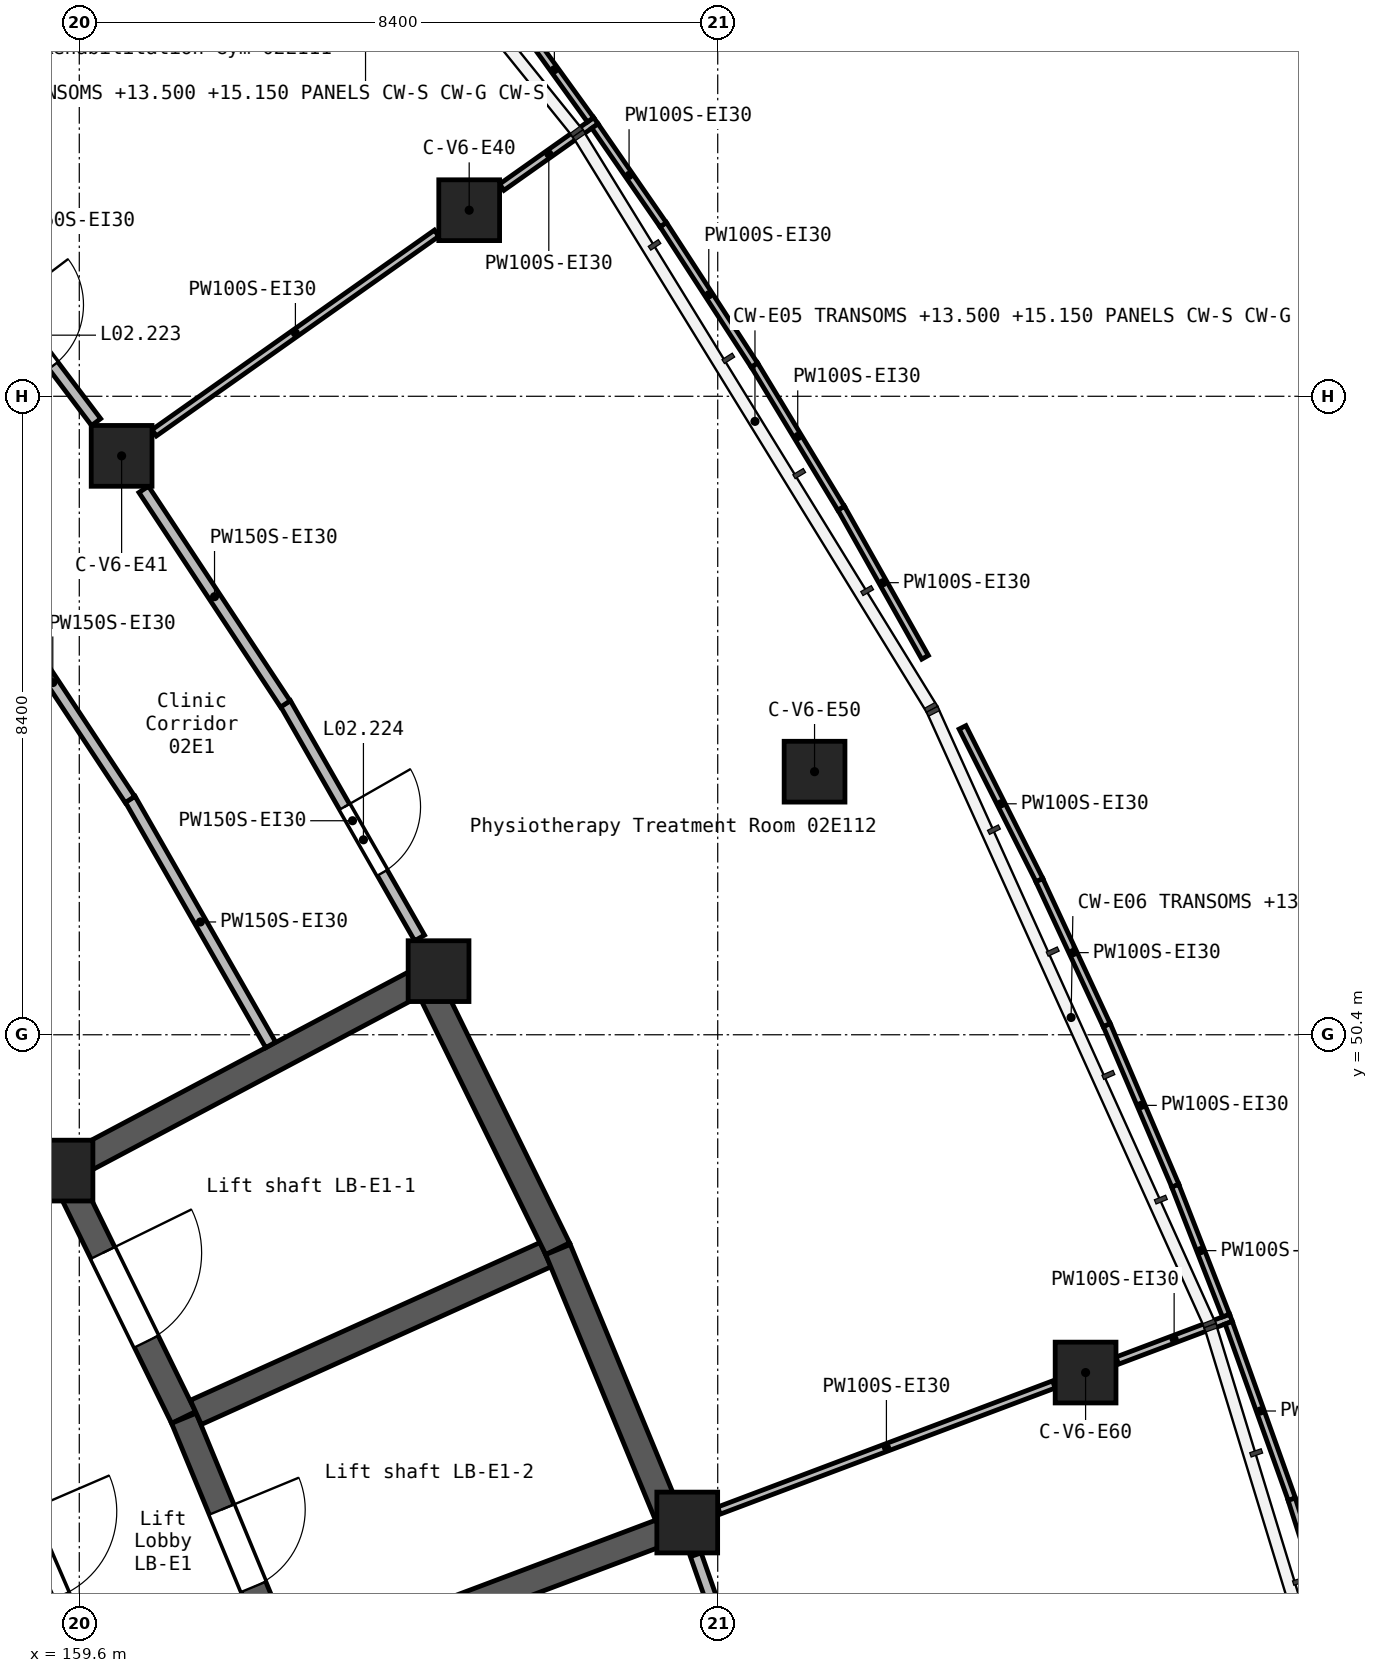
"""IFC4 building model, lengths in metres.
Left out: names, types, materials, properties, quantities, classifications, styles, units other than length and angle.
Written with IfcOpenShell. Run it as: python <this file> out.ifc"""

import sys

from ifc_helpers import new_model, si_unit, direction, frame, frame_2d, origin, origin_2d, place, context, subcontext, project, spatial, rectangle, extrude, element, fill, save


model = new_model("IFC4")
c1 = context("Model", 3, precision=1e-05, world=origin(), true_north=direction((0.0, 1.0)))
c2 = subcontext(c1, "Body", "Model", "MODEL_VIEW")
j1 = project(units=[si_unit("LENGTHUNIT", "METRE"), si_unit("PLANEANGLEUNIT", "RADIAN")], contexts=[c1])
p1 = place(None, origin())
s1 = spatial("IfcSite", under=j1, at=p1, CompositionType="ELEMENT")
p2 = place(p1, origin())
s2 = spatial("IfcBuilding", under=s1, at=p2, CompositionType="ELEMENT")
p3 = place(p2, frame((0.0, 0.0, 12.6)))
s3 = spatial("IfcBuildingStorey", under=s2, at=p3, CompositionType="ELEMENT", Elevation=12.6)
for number, where, z_axis, x_axis in (
    (1, (159.379, 48.613, 0.0), (0.0, 0.0, 1.0), (1.0, 0.0, 0.0)),
    (2, (160.157, 58.016, 0.0), (0.0, 0.0, 1.0), (1.0, 0.0, 0.0)),
    (3, (164.327, 51.237, 0.0), (0.0, 0.0, 1.0), (1.0, 0.0, 0.0)),
    (4, (164.73, 61.248, 0.0), (0.0, 0.0, 1.0), (1.0, 0.0, 0.0)),
    (5, (167.599, 43.983, 0.0), (0.0, 0.0, 1.0), (1.0, 0.0, 0.0)),
    (6, (169.274, 53.861, 0.0), (0.0, 0.0, 1.0), (1.0, 0.0, 0.0)),
    (7, (172.84, 45.956, 0.0), (0.0, 0.0, 1.0), (1.0, 0.0, 0.0)),
):
    element("IfcColumn", number, at=place(p3, frame(where, z_axis=z_axis, x_axis=x_axis)), inside=s3, PredefinedType="COLUMN", context=c2, shape_type="SweptSolid", body=[
        extrude(rectangle(XDim=0.8, YDim=0.8, at=origin_2d()), origin(), (0.0, 0.0, 1.0), 4.2),
    ])
p4 = place(p3, frame((159.224, 48.531, 0.0), z_axis=(0.0, 0.0, 1.0), x_axis=(0.883393138637, 0.468632652094, 0.0)))
e8 = element("IfcWall", 8, at=p4, inside=s3, PredefinedType="SHEAR", context=c2, shape_type="SweptSolid", body=[
    extrude(rectangle(XDim=5.751, YDim=0.35, at=frame_2d((2.875, 0.0))), origin(), (0.0, 0.0, 1.0), 4.2),
])
p5 = place(p3, frame((159.456, 48.456, 0.0), z_axis=(0.0, 0.0, 1.0), x_axis=(0.440221126053, -0.89788939195, 0.0)))
e9 = element("IfcWall", 9, at=p5, inside=s3, PredefinedType="SHEAR", context=c2, shape_type="SweptSolid", body=[
    extrude(rectangle(XDim=3.442, YDim=0.35, at=frame_2d((1.721, 0.0))), origin(), (0.0, 0.0, 1.0), 4.2),
])
p6 = place(p5, frame((1.031, 0.0, 0.0)))
e10 = element("IfcOpeningElement", 10, at=p6, cuts=e9, PredefinedType="OPENING", context=c2, shape_type="SweptSolid", body=[
    extrude(rectangle(XDim=1.3, YDim=2.1, at=frame_2d((0.65, 1.05))), frame((0.0, 0.185, 0.0), z_axis=(0.0, -1.0, 0.0), x_axis=(1.0, 0.0, 0.0)), (0.0, 0.0, 1.0), 0.37),
])
p7 = place(p3, frame((160.976, 45.355, 0.0), z_axis=(0.0, 0.0, 1.0), x_axis=(0.381990591944, -0.924166212143, 0.0)))
e11 = element("IfcWall", 11, at=p7, inside=s3, PredefinedType="SHEAR", context=c2, shape_type="SweptSolid", body=[
    extrude(rectangle(XDim=3.443, YDim=0.35, at=frame_2d((1.721, 0.0))), origin(), (0.0, 0.0, 1.0), 4.2),
])
p8 = place(p7, frame((1.3, 0.0, 0.0)))
e12 = element("IfcOpeningElement", 12, at=p8, cuts=e11, PredefinedType="OPENING", context=c2, shape_type="SweptSolid", body=[
    extrude(rectangle(XDim=1.1, YDim=2.1, at=frame_2d((0.55, 1.05))), frame((0.0, 0.185, 0.0), z_axis=(0.0, -1.0, 0.0), x_axis=(1.0, 0.0, 0.0)), (0.0, 0.0, 1.0), 0.37),
])
p9 = place(p3, frame((161.134, 45.432, 0.0), z_axis=(0.0, 0.0, 1.0), x_axis=(0.911564728385, 0.411156595427, 0.0)))
e13 = element("IfcWall", 13, at=p9, inside=s3, PredefinedType="SHEAR", context=c2, shape_type="SweptSolid", body=[
    extrude(rectangle(XDim=5.05, YDim=0.35, at=frame_2d((2.525, 0.0))), origin(), (0.0, 0.0, 1.0), 4.2),
])
p10 = place(p3, frame((162.194, 41.949, 0.0), z_axis=(0.0, 0.0, 1.0), x_axis=(0.935920223106, 0.352212061095, 0.0)))
e14 = element("IfcWall", 14, at=p10, inside=s3, PredefinedType="SHEAR", context=c2, shape_type="SweptSolid", body=[
    extrude(rectangle(XDim=5.75, YDim=0.35, at=frame_2d((2.875, 0.0))), origin(), (0.0, 0.0, 1.0), 4.2),
])
p11 = place(p3, frame((165.894, 47.585, 0.0), z_axis=(0.0, 0.0, 1.0), x_axis=(-0.43992897418, 0.898032570499, 0.0)))
e15 = element("IfcWall", 15, at=p11, inside=s3, PredefinedType="SHEAR", context=c2, shape_type="SweptSolid", body=[
    extrude(rectangle(XDim=3.788, YDim=0.35, at=frame_2d((1.894, 0.0))), origin(), (0.0, 0.0, 1.0), 4.2),
])
p12 = place(p3, frame((167.345, 44.075, 0.0), z_axis=(0.0, 0.0, 1.0), x_axis=(-0.382046231428, 0.924143212415, 0.0)))
e16 = element("IfcWall", 16, at=p12, inside=s3, PredefinedType="SHEAR", context=c2, shape_type="SweptSolid", body=[
    extrude(rectangle(XDim=3.788, YDim=0.35, at=frame_2d((1.894, 0.0))), origin(), (0.0, 0.0, 1.0), 4.2),
])
p13 = place(p3, frame((158.747, 44.465, 0.0), z_axis=(0.0, 0.0, 1.0), x_axis=(0.396322487651, -0.918111368943, 0.0)))
e17 = element("IfcWall", 17, at=p13, inside=s3, PredefinedType="SOLIDWALL", context=c2, shape_type="SweptSolid", body=[
    extrude(rectangle(XDim=1.936, YDim=0.2, at=frame_2d((0.968, 0.0))), origin(), (0.0, 0.0, 1.0), 3.85),
])
p14 = place(p13, frame((0.368, 0.0, 0.0)))
e18 = element("IfcOpeningElement", 18, at=p14, cuts=e17, PredefinedType="OPENING", context=c2, shape_type="SweptSolid", body=[
    extrude(rectangle(XDim=1.2, YDim=2.1, at=frame_2d((0.6, 1.05))), frame((0.0, 0.11, 0.0), z_axis=(0.0, -1.0, 0.0), x_axis=(1.0, 0.0, 0.0)), (0.0, 0.0, 1.0), 0.22),
])
p15 = place(p3, frame((162.313, 54.758, 0.0), z_axis=(0.0, 0.0, 1.0), x_axis=(0.496582798362, -0.867989357291, 0.0)))
e19 = element("IfcWall", 19, at=p15, inside=s3, PredefinedType="PARTITIONING", context=c2, shape_type="SweptSolid", body=[
    extrude(rectangle(XDim=3.553, YDim=0.15, at=frame_2d((1.777, 0.0))), origin(), (0.0, 0.0, 1.0), 3.85),
])
p16 = place(p15, frame((1.566, 0.0, 0.0)))
e20 = element("IfcOpeningElement", 20, at=p16, cuts=e19, PredefinedType="OPENING", context=c2, shape_type="SweptSolid", body=[
    extrude(rectangle(XDim=1.0, YDim=2.1, at=frame_2d((0.5, 1.05))), frame((0.0, 0.085, 0.0), z_axis=(0.0, -1.0, 0.0), x_axis=(1.0, 0.0, 0.0)), (0.0, 0.0, 1.0), 0.17),
])
p17 = place(p3, frame((160.448, 57.575, 0.0), z_axis=(0.0, 0.0, 1.0), x_axis=(0.550814058929, -0.834627984485, 0.0)))
e21 = element("IfcWall", 21, at=p17, inside=s3, PredefinedType="PARTITIONING", context=c2, shape_type="SweptSolid", body=[
    extrude(rectangle(XDim=3.383, YDim=0.15, at=frame_2d((1.692, 0.0))), origin(), (0.0, 0.0, 1.0), 3.85),
])
p18 = place(p3, frame((157.712, 61.252, 0.0), z_axis=(0.0, 0.0, 1.0), x_axis=(0.602876520925, -0.797834506974, 0.0)))
e22 = element("IfcWall", 22, at=p18, inside=s3, PredefinedType="PARTITIONING", context=c2, shape_type="SweptSolid", body=[
    extrude(rectangle(XDim=3.499, YDim=0.15, at=frame_2d((1.75, 0.0))), origin(), (0.0, 0.0, 1.0), 3.85),
])
p19 = place(p18, frame((1.565, 0.0, 0.0)))
e23 = element("IfcOpeningElement", 23, at=p19, cuts=e22, PredefinedType="OPENING", context=c2, shape_type="SweptSolid", body=[
    extrude(rectangle(XDim=1.0, YDim=2.1, at=frame_2d((0.5, 1.05))), frame((0.0, 0.085, 0.0), z_axis=(0.0, -1.0, 0.0), x_axis=(1.0, 0.0, 0.0)), (0.0, 0.0, 1.0), 0.17),
])
p20 = place(p3, frame((167.711, 43.559, 0.0), z_axis=(0.0, 0.0, 1.0), x_axis=(0.330491338893, -0.9438090246, 0.0)))
e24 = element("IfcWall", 24, at=p20, inside=s3, PredefinedType="PARTITIONING", context=c2, shape_type="SweptSolid", body=[
    extrude(rectangle(XDim=3.473, YDim=0.15, at=frame_2d((1.736, 0.0))), origin(), (0.0, 0.0, 1.0), 3.85),
])
p21 = place(p3, frame((160.269, 53.501, 0.0), z_axis=(0.0, 0.0, 1.0), x_axis=(0.496371795626, -0.8681100394, 0.0)))
e25 = element("IfcWall", 25, at=p21, inside=s3, PredefinedType="PARTITIONING", context=c2, shape_type="SweptSolid", body=[
    extrude(rectangle(XDim=3.726, YDim=0.15, at=frame_2d((1.863, 0.0))), origin(), (0.0, 0.0, 1.0), 3.85),
])
p22 = place(p3, frame((158.236, 56.571, 0.0), z_axis=(0.0, 0.0, 1.0), x_axis=(0.550996276136, -0.834507701393, 0.0)))
e26 = element("IfcWall", 26, at=p22, inside=s3, PredefinedType="PARTITIONING", context=c2, shape_type="SweptSolid", body=[
    extrude(rectangle(XDim=3.687, YDim=0.15, at=frame_2d((1.843, 0.0))), origin(), (0.0, 0.0, 1.0), 3.85),
])
p23 = place(p3, frame((168.016, 44.14, 0.0), z_axis=(0.0, 0.0, 1.0), x_axis=(0.935850976525, 0.352396012659, 0.0)))
e27 = element("IfcWall", 27, at=p23, inside=s3, PredefinedType="PARTITIONING", context=c2, shape_type="SweptSolid", body=[
    extrude(rectangle(XDim=4.708, YDim=0.1, at=frame_2d((2.354, 0.0))), origin(), (0.0, 0.0, 1.0), 3.85),
])
p24 = place(p3, frame((173.257, 46.114, 0.0), z_axis=(0.0, 0.0, 1.0), x_axis=(0.93586999438, 0.35234550319, 0.0)))
e28 = element("IfcWall", 28, at=p24, inside=s3, PredefinedType="PARTITIONING", context=c2, shape_type="SweptSolid", body=[
    extrude(rectangle(XDim=1.598, YDim=0.1, at=frame_2d((0.799, 0.0))), origin(), (0.0, 0.0, 1.0), 3.85),
])
p25 = place(p3, frame((160.585, 58.319, 0.0), z_axis=(0.0, 0.0, 1.0), x_axis=(0.816630246187, 0.577161191534, 0.0)))
e29 = element("IfcWall", 29, at=p25, inside=s3, PredefinedType="PARTITIONING", context=c2, shape_type="SweptSolid", body=[
    extrude(rectangle(XDim=4.551, YDim=0.1, at=frame_2d((2.275, 0.0))), origin(), (0.0, 0.0, 1.0), 3.85),
])
p26 = place(p3, frame((165.158, 61.551, 0.0), z_axis=(0.0, 0.0, 1.0), x_axis=(0.816659911288, 0.577119215842, 0.0)))
e30 = element("IfcWall", 30, at=p26, inside=s3, PredefinedType="PARTITIONING", context=c2, shape_type="SweptSolid", body=[
    extrude(rectangle(XDim=1.517, YDim=0.1, at=frame_2d((0.758, 0.0))), origin(), (0.0, 0.0, 1.0), 3.85),
])
p27 = place(p3, frame((174.723, 46.611, 0.0), z_axis=(0.0, 0.0, 1.0), x_axis=(0.336762779461, -0.94158952329, 0.0)))
e31 = element("IfcWall", 31, at=p27, inside=s3, PredefinedType="PARTITIONING", context=c2, shape_type="SweptSolid", body=[
    extrude(rectangle(XDim=2.466, YDim=0.1, at=frame_2d((1.233, 0.0))), origin(), (0.0, 0.0, 1.0), 3.85),
])
p28 = place(p3, frame((169.624, 57.33, 0.0), z_axis=(0.0, 0.0, 1.0), x_axis=(0.490245804698, -0.871584219095, 0.0)))
e32 = element("IfcWall", 32, at=p28, inside=s3, PredefinedType="PARTITIONING", context=c2, shape_type="SweptSolid", body=[
    extrude(rectangle(XDim=2.253, YDim=0.1, at=frame_2d((1.126, 0.0))), origin(), (0.0, 0.0, 1.0), 3.85),
])
p29 = place(p3, frame((168.482, 59.213, 0.0), z_axis=(0.0, 0.0, 1.0), x_axis=(0.517604223091, -0.855620165867, 0.0)))
e33 = element("IfcWall", 33, at=p29, inside=s3, PredefinedType="PARTITIONING", context=c2, shape_type="SweptSolid", body=[
    extrude(rectangle(XDim=2.204, YDim=0.1, at=frame_2d((1.102, 0.0))), origin(), (0.0, 0.0, 1.0), 3.85),
])
p30 = place(p3, frame((167.283, 61.059, 0.0), z_axis=(0.0, 0.0, 1.0), x_axis=(0.544248024884, -0.838924363342, 0.0)))
e34 = element("IfcWall", 34, at=p30, inside=s3, PredefinedType="PARTITIONING", context=c2, shape_type="SweptSolid", body=[
    extrude(rectangle(XDim=2.203, YDim=0.1, at=frame_2d((1.102, 0.0))), origin(), (0.0, 0.0, 1.0), 3.85),
])
p31 = place(p3, frame((171.221, 54.444, 0.0), z_axis=(0.0, 0.0, 1.0), x_axis=(0.449727785834, -0.893165672565, 0.0)))
e35 = element("IfcWall", 35, at=p31, inside=s3, PredefinedType="PARTITIONING", context=c2, shape_type="SweptSolid", body=[
    extrude(rectangle(XDim=2.251, YDim=0.1, at=frame_2d((1.125, 0.0))), origin(), (0.0, 0.0, 1.0), 3.85),
])
p32 = place(p3, frame((173.118, 50.529, 0.0), z_axis=(0.0, 0.0, 1.0), x_axis=(0.392535641105, -0.919736794122, 0.0)))
e36 = element("IfcWall", 36, at=p32, inside=s3, PredefinedType="PARTITIONING", context=c2, shape_type="SweptSolid", body=[
    extrude(rectangle(XDim=2.301, YDim=0.1, at=frame_2d((1.15, 0.0))), origin(), (0.0, 0.0, 1.0), 3.85),
])
p33 = place(p3, frame((175.552, 44.29, 0.0), z_axis=(0.0, 0.0, 1.0), x_axis=(0.304461914253, -0.952524510325, 0.0)))
e37 = element("IfcWall", 37, at=p33, inside=s3, PredefinedType="PARTITIONING", context=c2, shape_type="SweptSolid", body=[
    extrude(rectangle(XDim=2.202, YDim=0.1, at=frame_2d((1.101, 0.0))), origin(), (0.0, 0.0, 1.0), 3.85),
])
p34 = place(p3, frame((172.231, 52.434, 0.0), z_axis=(0.0, 0.0, 1.0), x_axis=(0.42144215668, -0.906855285353, 0.0)))
e38 = element("IfcWall", 38, at=p34, inside=s3, PredefinedType="PARTITIONING", context=c2, shape_type="SweptSolid", body=[
    extrude(rectangle(XDim=2.103, YDim=0.1, at=frame_2d((1.051, 0.0))), origin(), (0.0, 0.0, 1.0), 3.85),
])
p35 = place(p3, frame((174.02, 48.414, 0.0), z_axis=(0.0, 0.0, 1.0), x_axis=(0.364148326517, -0.931340966722, 0.0)))
e39 = element("IfcWall", 39, at=p35, inside=s3, PredefinedType="PARTITIONING", context=c2, shape_type="SweptSolid", body=[
    extrude(rectangle(XDim=1.834, YDim=0.1, at=frame_2d((0.917, 0.0))), origin(), (0.0, 0.0, 1.0), 3.85),
])
p36 = place(p3, frame((166.385, 62.355, 0.0), z_axis=(0.0, 0.0, 1.0), x_axis=(0.568646920536, -0.822581716163, 0.0)))
e40 = element("IfcWall", 40, at=p36, inside=s3, PredefinedType="PARTITIONING", context=c2, shape_type="SweptSolid", body=[
    extrude(rectangle(XDim=1.579, YDim=0.1, at=frame_2d((0.789, 0.0))), origin(), (0.0, 0.0, 1.0), 3.85),
])
p37 = place(p3, frame((165.375, 63.755, 0.0), z_axis=(0.0, 0.0, 1.0), x_axis=(0.585622227381, -0.810584114573, 0.0)))
e41 = element("IfcWall", 41, at=p37, inside=s3, PredefinedType="PARTITIONING", context=c2, shape_type="SweptSolid", body=[
    extrude(rectangle(XDim=1.625, YDim=0.1, at=frame_2d((0.812, 0.0))), origin(), (0.0, 0.0, 1.0), 3.85),
])
p38 = place(p14, origin())
e42 = element("IfcDoor", 42, at=p38, inside=s3, OperationType="SINGLE_SWING_LEFT", PredefinedType="DOOR", context=c2, shape_type="SweptSolid", body=[
    extrude(rectangle(XDim=1.2, YDim=2.1, at=frame_2d((0.6, 1.05))), frame((0.0, 0.025, 0.0), z_axis=(0.0, -1.0, 0.0), x_axis=(1.0, 0.0, 0.0)), (0.0, 0.0, 1.0), 0.05),
])
fill(e18, e42)
p39 = place(p19, origin())
e43 = element("IfcDoor", 43, at=p39, inside=s3, OperationType="SINGLE_SWING_RIGHT", PredefinedType="DOOR", context=c2, shape_type="SweptSolid", body=[
    extrude(rectangle(XDim=1.0, YDim=2.1, at=frame_2d((0.5, 1.05))), frame((0.0, 0.025, 0.0), z_axis=(0.0, -1.0, 0.0), x_axis=(1.0, 0.0, 0.0)), (0.0, 0.0, 1.0), 0.05),
])
fill(e23, e43)
p40 = place(p16, origin())
e44 = element("IfcDoor", 44, at=p40, inside=s3, OperationType="SINGLE_SWING_RIGHT", PredefinedType="DOOR", context=c2, shape_type="SweptSolid", body=[
    extrude(rectangle(XDim=1.0, YDim=2.1, at=frame_2d((0.5, 1.05))), frame((0.0, 0.025, 0.0), z_axis=(0.0, -1.0, 0.0), x_axis=(1.0, 0.0, 0.0)), (0.0, 0.0, 1.0), 0.05),
])
fill(e20, e44)
p41 = place(p6, origin())
e45 = element("IfcDoor", 45, at=p41, inside=s3, OperationType="DOUBLE_DOOR_SLIDING", PredefinedType="DOOR", context=c2, shape_type="SweptSolid", body=[
    extrude(rectangle(XDim=1.3, YDim=2.1, at=frame_2d((0.65, 1.05))), frame((0.0, 0.025, 0.0), z_axis=(0.0, -1.0, 0.0), x_axis=(1.0, 0.0, 0.0)), (0.0, 0.0, 1.0), 0.05),
])
fill(e10, e45)
p42 = place(p8, origin())
e46 = element("IfcDoor", 46, at=p42, inside=s3, OperationType="DOUBLE_DOOR_SLIDING", PredefinedType="DOOR", context=c2, shape_type="SweptSolid", body=[
    extrude(rectangle(XDim=1.1, YDim=2.1, at=frame_2d((0.55, 1.05))), frame((0.0, 0.025, 0.0), z_axis=(0.0, -1.0, 0.0), x_axis=(1.0, 0.0, 0.0)), (0.0, 0.0, 1.0), 0.05),
])
fill(e12, e46)
save(model, sys.argv[1])
